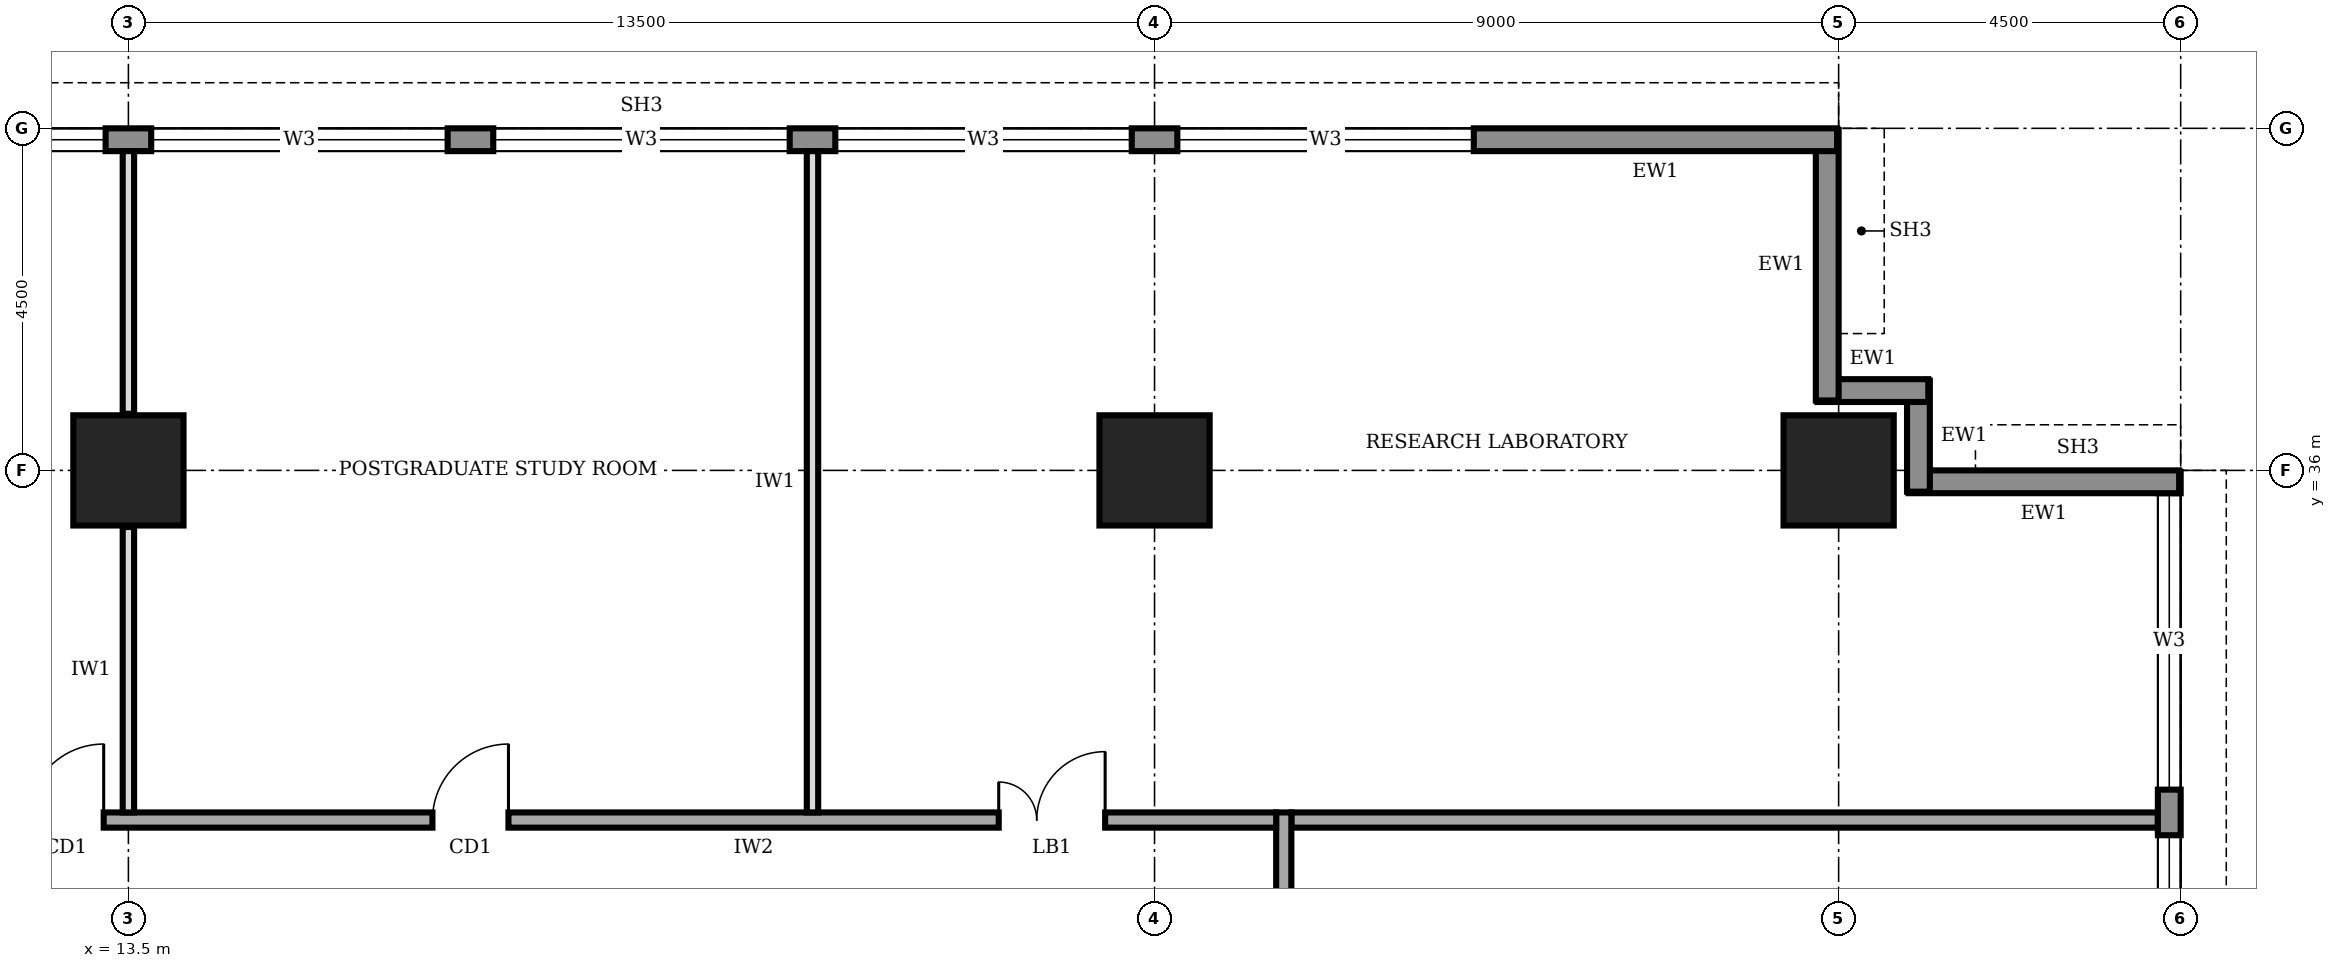
"""IFC4 building model, lengths in metres.
Left out: names, types, materials, properties, quantities, classifications, styles, units other than length and angle.
Written with IfcOpenShell. Run it as: python <this file> out.ifc"""

import sys

from ifc_helpers import new_model, si_unit, direction, frame, frame_2d, origin, origin_2d, place, context, subcontext, project, spatial, rectangle, extrude, element, fill, save


model = new_model("IFC4")
c1 = context("Model", 3, precision=1e-05, world=origin(), true_north=direction((0.0, 1.0)))
c2 = subcontext(c1, "Body", "Model", "MODEL_VIEW")
j1 = project(units=[si_unit("LENGTHUNIT", "METRE"), si_unit("PLANEANGLEUNIT", "RADIAN")], contexts=[c1])
p1 = place(None, origin())
s1 = spatial("IfcSite", under=j1, at=p1, CompositionType="ELEMENT")
p2 = place(p1, origin())
s2 = spatial("IfcBuilding", under=s1, at=p2, CompositionType="ELEMENT")
p3 = place(p2, frame((0.0, 0.0, 257.0)))
s3 = spatial("IfcBuildingStorey", under=s2, at=p3, CompositionType="ELEMENT", Elevation=257.0)
for number, where, z_axis, x_axis in (
    (1, (13.5, 36.0, 0.0), (0.0, 0.0, 1.0), (1.0, 0.0, 0.0)),
    (2, (27.0, 36.0, 0.0), (0.0, 0.0, 1.0), (1.0, 0.0, 0.0)),
    (3, (36.0, 36.0, 0.0), (0.0, 0.0, 1.0), (1.0, 0.0, 0.0)),
):
    element("IfcColumn", number, at=place(p3, frame(where, z_axis=z_axis, x_axis=x_axis)), inside=s3, PredefinedType="COLUMN", context=c2, shape_type="SweptSolid", body=[
        extrude(rectangle(XDim=1.45, YDim=1.45, at=origin_2d()), origin(), (0.0, 0.0, 1.0), 4.0),
    ])
p4 = place(p3, frame((40.35, 4.52, 0.0), z_axis=(0.0, 0.0, 1.0), x_axis=(0.0, 1.0, 0.0)))
e4 = element("IfcWall", 4, at=p4, inside=s3, PredefinedType="STANDARD", context=c2, shape_type="SweptSolid", body=[
    extrude(rectangle(XDim=31.46, YDim=0.3, at=frame_2d((15.73, 0.0))), origin(), (0.0, 0.0, 1.0), 3.75),
])
p5 = place(p4, frame((4.78, 0.0, 0.95)))
e5 = element("IfcOpeningElement", 5, at=p5, cuts=e4, PredefinedType="OPENING", context=c2, shape_type="SweptSolid", body=[
    extrude(rectangle(XDim=3.9, YDim=1.8, at=frame_2d((1.95, 0.9))), frame((0.0, 0.16, 0.0), z_axis=(0.0, -1.0, 0.0), x_axis=(1.0, 0.0, 0.0)), (0.0, 0.0, 1.0), 0.32),
])
p6 = place(p4, frame((9.28, 0.0, 0.95)))
e6 = element("IfcOpeningElement", 6, at=p6, cuts=e4, PredefinedType="OPENING", context=c2, shape_type="SweptSolid", body=[
    extrude(rectangle(XDim=3.9, YDim=1.8, at=frame_2d((1.95, 0.9))), frame((0.0, 0.16, 0.0), z_axis=(0.0, -1.0, 0.0), x_axis=(1.0, 0.0, 0.0)), (0.0, 0.0, 1.0), 0.32),
])
p7 = place(p4, frame((13.78, 0.0, 0.95)))
e7 = element("IfcOpeningElement", 7, at=p7, cuts=e4, PredefinedType="OPENING", context=c2, shape_type="SweptSolid", body=[
    extrude(rectangle(XDim=3.9, YDim=1.8, at=frame_2d((1.95, 0.9))), frame((0.0, 0.16, 0.0), z_axis=(0.0, -1.0, 0.0), x_axis=(1.0, 0.0, 0.0)), (0.0, 0.0, 1.0), 0.32),
])
p8 = place(p4, frame((18.28, 0.0, 0.95)))
e8 = element("IfcOpeningElement", 8, at=p8, cuts=e4, PredefinedType="OPENING", context=c2, shape_type="SweptSolid", body=[
    extrude(rectangle(XDim=3.9, YDim=1.8, at=frame_2d((1.95, 0.9))), frame((0.0, 0.16, 0.0), z_axis=(0.0, -1.0, 0.0), x_axis=(1.0, 0.0, 0.0)), (0.0, 0.0, 1.0), 0.32),
])
p9 = place(p4, frame((22.78, 0.0, 0.95)))
e9 = element("IfcOpeningElement", 9, at=p9, cuts=e4, PredefinedType="OPENING", context=c2, shape_type="SweptSolid", body=[
    extrude(rectangle(XDim=3.9, YDim=1.8, at=frame_2d((1.95, 0.9))), frame((0.0, 0.16, 0.0), z_axis=(0.0, -1.0, 0.0), x_axis=(1.0, 0.0, 0.0)), (0.0, 0.0, 1.0), 0.32),
])
p10 = place(p4, frame((27.28, 0.0, 0.95)))
e10 = element("IfcOpeningElement", 10, at=p10, cuts=e4, PredefinedType="OPENING", context=c2, shape_type="SweptSolid", body=[
    extrude(rectangle(XDim=3.9, YDim=1.8, at=frame_2d((1.95, 0.9))), frame((0.0, 0.16, 0.0), z_axis=(0.0, -1.0, 0.0), x_axis=(1.0, 0.0, 0.0)), (0.0, 0.0, 1.0), 0.32),
])
p11 = place(p3, frame((40.48, 35.85, 0.0), z_axis=(0.0, 0.0, 1.0), x_axis=(-1.0, 0.0, 0.0)))
e11 = element("IfcWall", 11, at=p11, inside=s3, PredefinedType="STANDARD", context=c2, shape_type="SweptSolid", body=[
    extrude(rectangle(XDim=3.56, YDim=0.3, at=frame_2d((1.78, 0.0))), origin(), (0.0, 0.0, 1.0), 2.85),
])
for number, where, z_axis, x_axis in (
    (12, (37.05, 35.72, 0.0), (0.0, 0.0, 1.0), (0.0, 1.0, 0.0)),
    (13, (37.18, 37.05, 0.0), (0.0, 0.0, 1.0), (-1.0, 0.0, 0.0)),
):
    element("IfcWall", number, at=place(p3, frame(where, z_axis=z_axis, x_axis=x_axis)), inside=s3, PredefinedType="STANDARD", context=c2, shape_type="SweptSolid", body=[
        extrude(rectangle(XDim=1.46, YDim=0.3, at=frame_2d((0.73, 0.0))), origin(), (0.0, 0.0, 1.0), 3.75),
    ])
p12 = place(p3, frame((35.85, 36.92, 0.0), z_axis=(0.0, 0.0, 1.0), x_axis=(0.0, 1.0, 0.0)))
e14 = element("IfcWall", 14, at=p12, inside=s3, PredefinedType="STANDARD", context=c2, shape_type="SweptSolid", body=[
    extrude(rectangle(XDim=3.56, YDim=0.3, at=frame_2d((1.78, 0.0))), origin(), (0.0, 0.0, 1.0), 2.85),
])
p13 = place(p3, frame((35.98, 40.35, 0.0), z_axis=(0.0, 0.0, 1.0), x_axis=(-1.0, 0.0, 0.0)))
e15 = element("IfcWall", 15, at=p13, inside=s3, PredefinedType="STANDARD", context=c2, shape_type="SweptSolid", body=[
    extrude(rectangle(XDim=31.46, YDim=0.3, at=frame_2d((15.73, 0.0))), origin(), (0.0, 0.0, 1.0), 3.75),
])
p14 = place(p13, frame((27.28, 0.0, 0.95)))
e16 = element("IfcOpeningElement", 16, at=p14, cuts=e15, PredefinedType="OPENING", context=c2, shape_type="SweptSolid", body=[
    extrude(rectangle(XDim=3.9, YDim=1.8, at=frame_2d((1.95, 0.9))), frame((0.0, 0.16, 0.0), z_axis=(0.0, -1.0, 0.0), x_axis=(1.0, 0.0, 0.0)), (0.0, 0.0, 1.0), 0.32),
])
p15 = place(p13, frame((22.78, 0.0, 0.95)))
e17 = element("IfcOpeningElement", 17, at=p15, cuts=e15, PredefinedType="OPENING", context=c2, shape_type="SweptSolid", body=[
    extrude(rectangle(XDim=3.9, YDim=1.8, at=frame_2d((1.95, 0.9))), frame((0.0, 0.16, 0.0), z_axis=(0.0, -1.0, 0.0), x_axis=(1.0, 0.0, 0.0)), (0.0, 0.0, 1.0), 0.32),
])
p16 = place(p13, frame((18.28, 0.0, 0.95)))
e18 = element("IfcOpeningElement", 18, at=p16, cuts=e15, PredefinedType="OPENING", context=c2, shape_type="SweptSolid", body=[
    extrude(rectangle(XDim=3.9, YDim=1.8, at=frame_2d((1.95, 0.9))), frame((0.0, 0.16, 0.0), z_axis=(0.0, -1.0, 0.0), x_axis=(1.0, 0.0, 0.0)), (0.0, 0.0, 1.0), 0.32),
])
p17 = place(p13, frame((13.78, 0.0, 0.95)))
e19 = element("IfcOpeningElement", 19, at=p17, cuts=e15, PredefinedType="OPENING", context=c2, shape_type="SweptSolid", body=[
    extrude(rectangle(XDim=3.9, YDim=1.8, at=frame_2d((1.95, 0.9))), frame((0.0, 0.16, 0.0), z_axis=(0.0, -1.0, 0.0), x_axis=(1.0, 0.0, 0.0)), (0.0, 0.0, 1.0), 0.32),
])
p18 = place(p13, frame((9.28, 0.0, 0.95)))
e20 = element("IfcOpeningElement", 20, at=p18, cuts=e15, PredefinedType="OPENING", context=c2, shape_type="SweptSolid", body=[
    extrude(rectangle(XDim=3.9, YDim=1.8, at=frame_2d((1.95, 0.9))), frame((0.0, 0.16, 0.0), z_axis=(0.0, -1.0, 0.0), x_axis=(1.0, 0.0, 0.0)), (0.0, 0.0, 1.0), 0.32),
])
p19 = place(p13, frame((4.78, 0.0, 0.95)))
e21 = element("IfcOpeningElement", 21, at=p19, cuts=e15, PredefinedType="OPENING", context=c2, shape_type="SweptSolid", body=[
    extrude(rectangle(XDim=3.9, YDim=1.8, at=frame_2d((1.95, 0.9))), frame((0.0, 0.16, 0.0), z_axis=(0.0, -1.0, 0.0), x_axis=(1.0, 0.0, 0.0)), (0.0, 0.0, 1.0), 0.32),
])
p20 = place(p3, frame((28.7, 9.2, 0.0), z_axis=(0.0, 0.0, 1.0), x_axis=(0.0, 1.0, 0.0)))
e22 = element("IfcWall", 22, at=p20, inside=s3, PredefinedType="SOLIDWALL", context=c2, shape_type="SweptSolid", body=[
    extrude(rectangle(XDim=22.3, YDim=0.2, at=frame_2d((11.15, 0.0))), origin(), (0.0, 0.0, 1.0), 3.75),
])
p21 = place(p20, frame((1.55, 0.0, 0.0)))
e23 = element("IfcOpeningElement", 23, at=p21, cuts=e22, PredefinedType="OPENING", context=c2, shape_type="SweptSolid", body=[
    extrude(rectangle(XDim=1.0, YDim=2.1, at=frame_2d((0.5, 1.05))), frame((0.0, 0.11, 0.0), z_axis=(0.0, -1.0, 0.0), x_axis=(1.0, 0.0, 0.0)), (0.0, 0.0, 1.0), 0.22),
])
p22 = place(p20, frame((6.05, 0.0, 0.0)))
e24 = element("IfcOpeningElement", 24, at=p22, cuts=e22, PredefinedType="OPENING", context=c2, shape_type="SweptSolid", body=[
    extrude(rectangle(XDim=1.0, YDim=2.1, at=frame_2d((0.5, 1.05))), frame((0.0, 0.11, 0.0), z_axis=(0.0, -1.0, 0.0), x_axis=(1.0, 0.0, 0.0)), (0.0, 0.0, 1.0), 0.22),
])
p23 = place(p20, frame((10.55, 0.0, 0.0)))
e25 = element("IfcOpeningElement", 25, at=p23, cuts=e22, PredefinedType="OPENING", context=c2, shape_type="SweptSolid", body=[
    extrude(rectangle(XDim=1.0, YDim=2.1, at=frame_2d((0.5, 1.05))), frame((0.0, 0.11, 0.0), z_axis=(0.0, -1.0, 0.0), x_axis=(1.0, 0.0, 0.0)), (0.0, 0.0, 1.0), 0.22),
])
p24 = place(p20, frame((15.05, 0.0, 0.0)))
e26 = element("IfcOpeningElement", 26, at=p24, cuts=e22, PredefinedType="OPENING", context=c2, shape_type="SweptSolid", body=[
    extrude(rectangle(XDim=1.0, YDim=2.1, at=frame_2d((0.5, 1.05))), frame((0.0, 0.11, 0.0), z_axis=(0.0, -1.0, 0.0), x_axis=(1.0, 0.0, 0.0)), (0.0, 0.0, 1.0), 0.22),
])
p25 = place(p20, frame((19.55, 0.0, 0.0)))
e27 = element("IfcOpeningElement", 27, at=p25, cuts=e22, PredefinedType="OPENING", context=c2, shape_type="SweptSolid", body=[
    extrude(rectangle(XDim=1.0, YDim=2.1, at=frame_2d((0.5, 1.05))), frame((0.0, 0.11, 0.0), z_axis=(0.0, -1.0, 0.0), x_axis=(1.0, 0.0, 0.0)), (0.0, 0.0, 1.0), 0.22),
])
p26 = place(p3, frame((28.6, 31.4, 0.0), z_axis=(0.0, 0.0, 1.0), x_axis=(-1.0, 0.0, 0.0)))
e28 = element("IfcWall", 28, at=p26, inside=s3, PredefinedType="SOLIDWALL", context=c2, shape_type="SweptSolid", body=[
    extrude(rectangle(XDim=16.9, YDim=0.2, at=frame_2d((8.45, 0.0))), origin(), (0.0, 0.0, 1.0), 3.75),
])
p27 = place(p26, frame((15.425, 0.0, 0.0)))
e29 = element("IfcOpeningElement", 29, at=p27, cuts=e28, PredefinedType="OPENING", context=c2, shape_type="SweptSolid", body=[
    extrude(rectangle(XDim=1.0, YDim=2.1, at=frame_2d((0.5, 1.05))), frame((0.0, 0.11, 0.0), z_axis=(0.0, -1.0, 0.0), x_axis=(1.0, 0.0, 0.0)), (0.0, 0.0, 1.0), 0.22),
])
p28 = place(p26, frame((10.1, 0.0, 0.0)))
e30 = element("IfcOpeningElement", 30, at=p28, cuts=e28, PredefinedType="OPENING", context=c2, shape_type="SweptSolid", body=[
    extrude(rectangle(XDim=1.0, YDim=2.1, at=frame_2d((0.5, 1.05))), frame((0.0, 0.11, 0.0), z_axis=(0.0, -1.0, 0.0), x_axis=(1.0, 0.0, 0.0)), (0.0, 0.0, 1.0), 0.22),
])
p29 = place(p26, frame((2.25, 0.0, 0.0)))
e31 = element("IfcOpeningElement", 31, at=p29, cuts=e28, PredefinedType="OPENING", context=c2, shape_type="SweptSolid", body=[
    extrude(rectangle(XDim=1.4, YDim=2.1, at=frame_2d((0.7, 1.05))), frame((0.0, 0.11, 0.0), z_axis=(0.0, -1.0, 0.0), x_axis=(1.0, 0.0, 0.0)), (0.0, 0.0, 1.0), 0.22),
])
p30 = place(p3, frame((28.8, 31.4, 0.0), z_axis=(0.0, 0.0, 1.0), x_axis=(1.0, 0.0, 0.0)))
e32 = element("IfcWall", 32, at=p30, inside=s3, PredefinedType="SOLIDWALL", context=c2, shape_type="SweptSolid", body=[
    extrude(rectangle(XDim=11.4, YDim=0.2, at=frame_2d((5.7, 0.0))), origin(), (0.0, 0.0, 1.0), 3.75),
])
p31 = place(p3, frame((13.5, 31.5, 0.0), z_axis=(0.0, 0.0, 1.0), x_axis=(0.0, 1.0, 0.0)))
e33 = element("IfcWall", 33, at=p31, inside=s3, PredefinedType="PARTITIONING", context=c2, shape_type="SweptSolid", body=[
    extrude(rectangle(XDim=3.755, YDim=0.15, at=frame_2d((1.877, 0.0))), origin(), (0.0, 0.0, 1.0), 2.85),
])
p32 = place(p3, frame((13.5, 36.745, 0.0), z_axis=(0.0, 0.0, 1.0), x_axis=(0.0, 1.0, 0.0)))
e34 = element("IfcWall", 34, at=p32, inside=s3, PredefinedType="PARTITIONING", context=c2, shape_type="SweptSolid", body=[
    extrude(rectangle(XDim=3.455, YDim=0.15, at=frame_2d((1.728, 0.0))), origin(), (0.0, 0.0, 1.0), 2.85),
])
p33 = place(p3, frame((22.5, 31.5, 0.0), z_axis=(0.0, 0.0, 1.0), x_axis=(0.0, 1.0, 0.0)))
e35 = element("IfcWall", 35, at=p33, inside=s3, PredefinedType="PARTITIONING", context=c2, shape_type="SweptSolid", body=[
    extrude(rectangle(XDim=8.7, YDim=0.15, at=frame_2d((4.35, 0.0))), origin(), (0.0, 0.0, 1.0), 3.75),
])
p34 = place(p9, origin())
e36 = element("IfcWindow", 36, at=p34, inside=s3, PartitioningType="SINGLE_PANEL", PredefinedType="WINDOW", context=c2, shape_type="SweptSolid", body=[
    extrude(rectangle(XDim=3.9, YDim=1.8, at=frame_2d((1.95, 0.9))), frame((0.0, 0.03, 0.0), z_axis=(0.0, -1.0, 0.0), x_axis=(1.0, 0.0, 0.0)), (0.0, 0.0, 1.0), 0.06),
])
fill(e9, e36)
p35 = place(p10, origin())
e37 = element("IfcWindow", 37, at=p35, inside=s3, PartitioningType="SINGLE_PANEL", PredefinedType="WINDOW", context=c2, shape_type="SweptSolid", body=[
    extrude(rectangle(XDim=3.9, YDim=1.8, at=frame_2d((1.95, 0.9))), frame((0.0, 0.03, 0.0), z_axis=(0.0, -1.0, 0.0), x_axis=(1.0, 0.0, 0.0)), (0.0, 0.0, 1.0), 0.06),
])
fill(e10, e37)
p36 = place(p15, origin())
e38 = element("IfcWindow", 38, at=p36, inside=s3, PartitioningType="SINGLE_PANEL", PredefinedType="WINDOW", context=c2, shape_type="SweptSolid", body=[
    extrude(rectangle(XDim=3.9, YDim=1.8, at=frame_2d((1.95, 0.9))), frame((0.0, 0.03, 0.0), z_axis=(0.0, -1.0, 0.0), x_axis=(1.0, 0.0, 0.0)), (0.0, 0.0, 1.0), 0.06),
])
fill(e17, e38)
p37 = place(p16, origin())
e39 = element("IfcWindow", 39, at=p37, inside=s3, PartitioningType="SINGLE_PANEL", PredefinedType="WINDOW", context=c2, shape_type="SweptSolid", body=[
    extrude(rectangle(XDim=3.9, YDim=1.8, at=frame_2d((1.95, 0.9))), frame((0.0, 0.03, 0.0), z_axis=(0.0, -1.0, 0.0), x_axis=(1.0, 0.0, 0.0)), (0.0, 0.0, 1.0), 0.06),
])
fill(e18, e39)
p38 = place(p17, origin())
e40 = element("IfcWindow", 40, at=p38, inside=s3, PartitioningType="SINGLE_PANEL", PredefinedType="WINDOW", context=c2, shape_type="SweptSolid", body=[
    extrude(rectangle(XDim=3.9, YDim=1.8, at=frame_2d((1.95, 0.9))), frame((0.0, 0.03, 0.0), z_axis=(0.0, -1.0, 0.0), x_axis=(1.0, 0.0, 0.0)), (0.0, 0.0, 1.0), 0.06),
])
fill(e19, e40)
p39 = place(p18, origin())
e41 = element("IfcWindow", 41, at=p39, inside=s3, PartitioningType="SINGLE_PANEL", PredefinedType="WINDOW", context=c2, shape_type="SweptSolid", body=[
    extrude(rectangle(XDim=3.9, YDim=1.8, at=frame_2d((1.95, 0.9))), frame((0.0, 0.03, 0.0), z_axis=(0.0, -1.0, 0.0), x_axis=(1.0, 0.0, 0.0)), (0.0, 0.0, 1.0), 0.06),
])
fill(e20, e41)
p40 = place(p19, origin())
e42 = element("IfcWindow", 42, at=p40, inside=s3, PartitioningType="SINGLE_PANEL", PredefinedType="WINDOW", context=c2, shape_type="SweptSolid", body=[
    extrude(rectangle(XDim=3.9, YDim=1.8, at=frame_2d((1.95, 0.9))), frame((0.0, 0.03, 0.0), z_axis=(0.0, -1.0, 0.0), x_axis=(1.0, 0.0, 0.0)), (0.0, 0.0, 1.0), 0.06),
])
fill(e21, e42)
p41 = place(p27, frame((1.0, 0.0, 0.0), z_axis=(0.0, 0.0, 1.0), x_axis=(-1.0, 0.0, 0.0)))
e43 = element("IfcDoor", 43, at=p41, inside=s3, OperationType="SINGLE_SWING_RIGHT", PredefinedType="DOOR", context=c2, shape_type="SweptSolid", body=[
    extrude(rectangle(XDim=1.0, YDim=2.1, at=frame_2d((0.5, 1.05))), frame((0.0, 0.025, 0.0), z_axis=(0.0, -1.0, 0.0), x_axis=(1.0, 0.0, 0.0)), (0.0, 0.0, 1.0), 0.05),
])
fill(e29, e43)
p42 = place(p28, frame((1.0, 0.0, 0.0), z_axis=(0.0, 0.0, 1.0), x_axis=(-1.0, 0.0, 0.0)))
e44 = element("IfcDoor", 44, at=p42, inside=s3, OperationType="SINGLE_SWING_RIGHT", PredefinedType="DOOR", context=c2, shape_type="SweptSolid", body=[
    extrude(rectangle(XDim=1.0, YDim=2.1, at=frame_2d((0.5, 1.05))), frame((0.0, 0.025, 0.0), z_axis=(0.0, -1.0, 0.0), x_axis=(1.0, 0.0, 0.0)), (0.0, 0.0, 1.0), 0.05),
])
fill(e30, e44)
p43 = place(p29, frame((1.4, 0.0, 0.0), z_axis=(0.0, 0.0, 1.0), x_axis=(-1.0, 0.0, 0.0)))
e45 = element("IfcDoor", 45, at=p43, inside=s3, OperationType="DOUBLE_DOOR_SINGLE_SWING", PredefinedType="DOOR", context=c2, shape_type="SweptSolid", body=[
    extrude(rectangle(XDim=1.4, YDim=2.1, at=frame_2d((0.7, 1.05))), frame((0.0, 0.025, 0.0), z_axis=(0.0, -1.0, 0.0), x_axis=(1.0, 0.0, 0.0)), (0.0, 0.0, 1.0), 0.05),
])
fill(e31, e45)
save(model, sys.argv[1])
